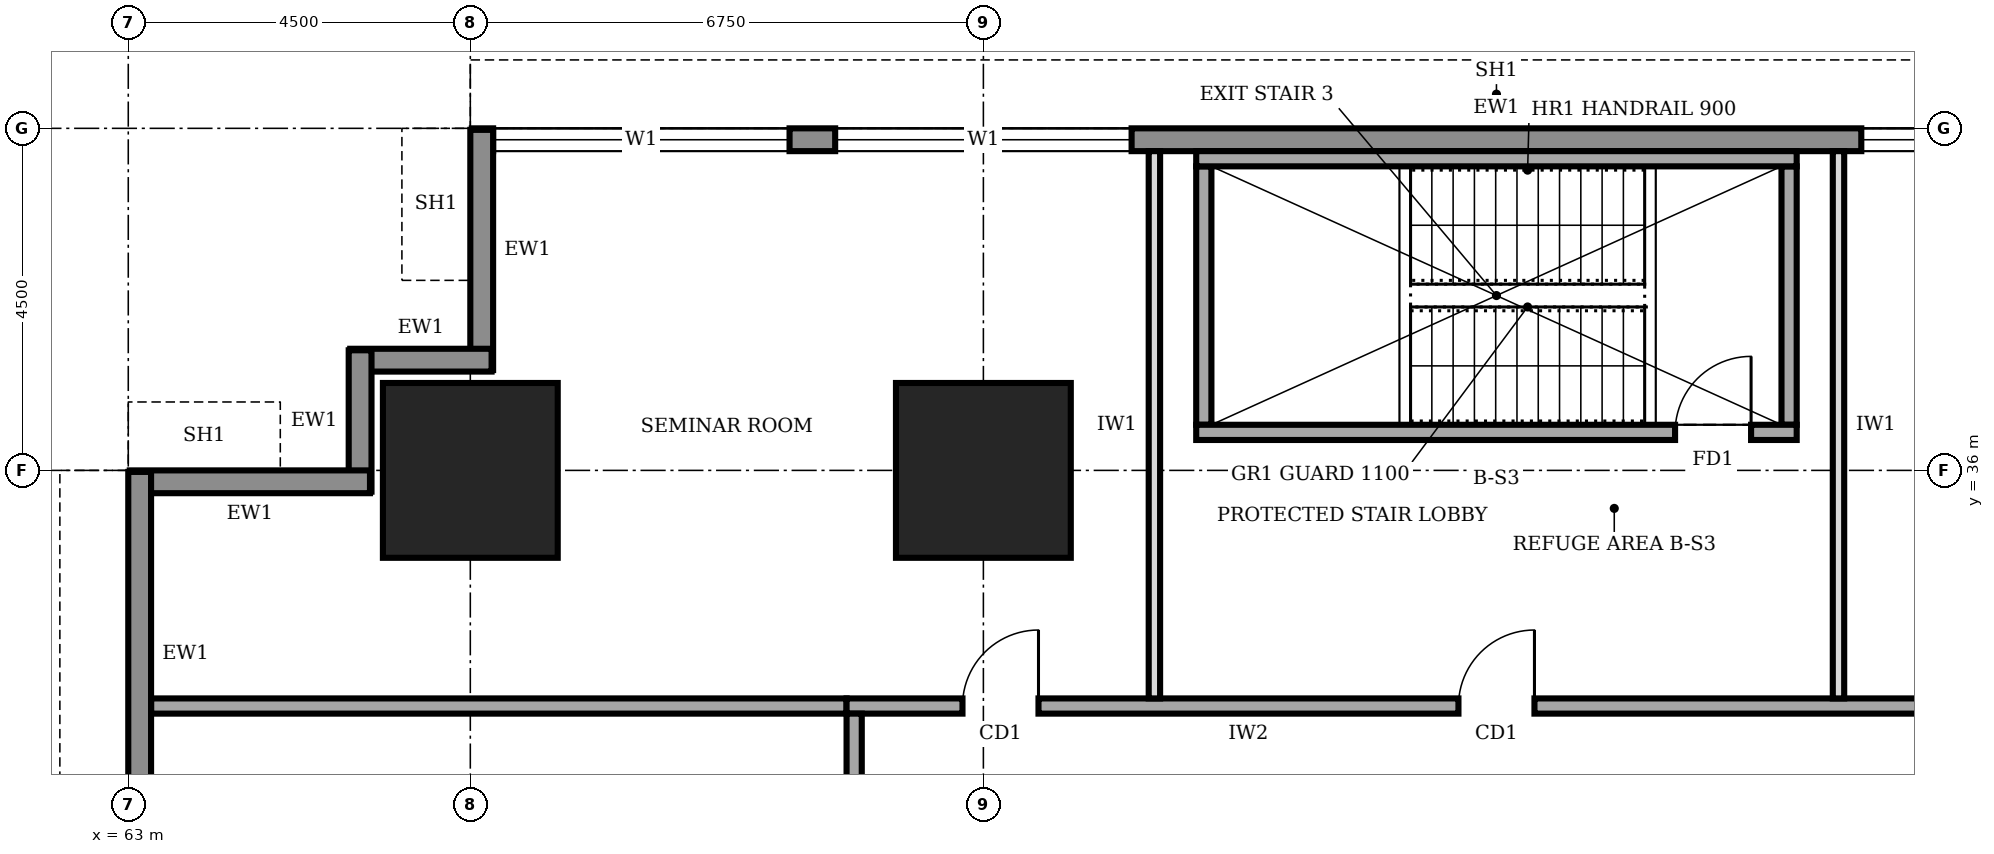
"""IFC4 building model, lengths in metres.
Left out: names, types, materials, properties, quantities, classifications, styles, units other than length and angle.
Written with IfcOpenShell. Run it as: python <this file> out.ifc"""

import sys

from ifc_helpers import new_model, si_unit, direction, frame, frame_2d, origin, origin_2d, place, context, subcontext, project, spatial, rectangle, extrude, element, fill, save


model = new_model("IFC4")
c1 = context("Model", 3, precision=1e-05, world=origin(), true_north=direction((0.0, 1.0)))
c2 = subcontext(c1, "Body", "Model", "MODEL_VIEW")
j1 = project(units=[si_unit("LENGTHUNIT", "METRE"), si_unit("PLANEANGLEUNIT", "RADIAN")], contexts=[c1])
p1 = place(None, origin())
s1 = spatial("IfcSite", under=j1, at=p1, CompositionType="ELEMENT")
p2 = place(p1, origin())
s2 = spatial("IfcBuilding", under=s1, at=p2, CompositionType="ELEMENT")
p3 = place(p2, frame((0.0, 0.0, 25.0)))
s3 = spatial("IfcBuildingStorey", under=s2, at=p3, CompositionType="ELEMENT", Elevation=25.0)
for number, where, z_axis, x_axis in (
    (1, (67.5, 36.0, 0.0), (0.0, 0.0, 1.0), (1.0, 0.0, 0.0)),
    (2, (74.25, 36.0, 0.0), (0.0, 0.0, 1.0), (1.0, 0.0, 0.0)),
):
    element("IfcColumn", number, at=place(p3, frame(where, z_axis=z_axis, x_axis=x_axis)), inside=s3, PredefinedType="COLUMN", context=c2, shape_type="SweptSolid", body=[
        extrude(rectangle(XDim=2.3, YDim=2.3, at=origin_2d()), origin(), (0.0, 0.0, 1.0), 4.0),
    ])
p4 = place(p3, frame((94.48, 40.35, 0.0), z_axis=(0.0, 0.0, 1.0), x_axis=(-1.0, 0.0, 0.0)))
e3 = element("IfcWall", 3, at=p4, inside=s3, PredefinedType="STANDARD", context=c2, shape_type="SweptSolid", body=[
    extrude(rectangle(XDim=26.96, YDim=0.3, at=frame_2d((13.48, 0.0))), origin(), (0.0, 0.0, 1.0), 3.75),
])
p5 = place(p4, frame((22.78, 0.0, 0.9)))
e4 = element("IfcOpeningElement", 4, at=p5, cuts=e3, PredefinedType="OPENING", context=c2, shape_type="SweptSolid", body=[
    extrude(rectangle(XDim=3.9, YDim=2.2, at=frame_2d((1.95, 1.1))), frame((0.0, 0.16, 0.0), z_axis=(0.0, -1.0, 0.0), x_axis=(1.0, 0.0, 0.0)), (0.0, 0.0, 1.0), 0.32),
])
p6 = place(p4, frame((18.28, 0.0, 0.9)))
e5 = element("IfcOpeningElement", 5, at=p6, cuts=e3, PredefinedType="OPENING", context=c2, shape_type="SweptSolid", body=[
    extrude(rectangle(XDim=3.9, YDim=2.2, at=frame_2d((1.95, 1.1))), frame((0.0, 0.16, 0.0), z_axis=(0.0, -1.0, 0.0), x_axis=(1.0, 0.0, 0.0)), (0.0, 0.0, 1.0), 0.32),
])
p7 = place(p4, frame((4.78, 0.0, 0.9)))
e6 = element("IfcOpeningElement", 6, at=p7, cuts=e3, PredefinedType="OPENING", context=c2, shape_type="SweptSolid", body=[
    extrude(rectangle(XDim=3.9, YDim=2.2, at=frame_2d((1.95, 1.1))), frame((0.0, 0.16, 0.0), z_axis=(0.0, -1.0, 0.0), x_axis=(1.0, 0.0, 0.0)), (0.0, 0.0, 1.0), 0.32),
])
p8 = place(p3, frame((67.65, 40.48, 0.0), z_axis=(0.0, 0.0, 1.0), x_axis=(0.0, -1.0, 0.0)))
e7 = element("IfcWall", 7, at=p8, inside=s3, PredefinedType="STANDARD", context=c2, shape_type="SweptSolid", body=[
    extrude(rectangle(XDim=3.16, YDim=0.3, at=frame_2d((1.58, 0.0))), origin(), (0.0, 0.0, 1.0), 2.85),
])
for number, where, z_axis, x_axis in (
    (8, (67.78, 37.45, 0.0), (0.0, 0.0, 1.0), (-1.0, 0.0, 0.0)),
    (9, (66.05, 37.58, 0.0), (0.0, 0.0, 1.0), (0.0, -1.0, 0.0)),
):
    element("IfcWall", number, at=place(p3, frame(where, z_axis=z_axis, x_axis=x_axis)), inside=s3, PredefinedType="STANDARD", context=c2, shape_type="SweptSolid", body=[
        extrude(rectangle(XDim=1.86, YDim=0.3, at=frame_2d((0.93, 0.0))), origin(), (0.0, 0.0, 1.0), 3.75),
    ])
p9 = place(p3, frame((66.18, 35.85, 0.0), z_axis=(0.0, 0.0, 1.0), x_axis=(-1.0, 0.0, 0.0)))
e10 = element("IfcWall", 10, at=p9, inside=s3, PredefinedType="STANDARD", context=c2, shape_type="SweptSolid", body=[
    extrude(rectangle(XDim=3.16, YDim=0.3, at=frame_2d((1.58, 0.0))), origin(), (0.0, 0.0, 1.0), 2.85),
])
p10 = place(p3, frame((63.15, 35.98, 0.0), z_axis=(0.0, 0.0, 1.0), x_axis=(0.0, -1.0, 0.0)))
e11 = element("IfcWall", 11, at=p10, inside=s3, PredefinedType="STANDARD", context=c2, shape_type="SweptSolid", body=[
    extrude(rectangle(XDim=31.46, YDim=0.3, at=frame_2d((15.73, 0.0))), origin(), (0.0, 0.0, 1.0), 3.75),
])
p11 = place(p10, frame((27.28, 0.0, 0.9)))
e12 = element("IfcOpeningElement", 12, at=p11, cuts=e11, PredefinedType="OPENING", context=c2, shape_type="SweptSolid", body=[
    extrude(rectangle(XDim=3.9, YDim=2.2, at=frame_2d((1.95, 1.1))), frame((0.0, 0.16, 0.0), z_axis=(0.0, -1.0, 0.0), x_axis=(1.0, 0.0, 0.0)), (0.0, 0.0, 1.0), 0.32),
])
p12 = place(p10, frame((22.78, 0.0, 0.9)))
e13 = element("IfcOpeningElement", 13, at=p12, cuts=e11, PredefinedType="OPENING", context=c2, shape_type="SweptSolid", body=[
    extrude(rectangle(XDim=3.9, YDim=2.2, at=frame_2d((1.95, 1.1))), frame((0.0, 0.16, 0.0), z_axis=(0.0, -1.0, 0.0), x_axis=(1.0, 0.0, 0.0)), (0.0, 0.0, 1.0), 0.32),
])
p13 = place(p10, frame((18.28, 0.0, 0.9)))
e14 = element("IfcOpeningElement", 14, at=p13, cuts=e11, PredefinedType="OPENING", context=c2, shape_type="SweptSolid", body=[
    extrude(rectangle(XDim=3.9, YDim=2.2, at=frame_2d((1.95, 1.1))), frame((0.0, 0.16, 0.0), z_axis=(0.0, -1.0, 0.0), x_axis=(1.0, 0.0, 0.0)), (0.0, 0.0, 1.0), 0.32),
])
p14 = place(p10, frame((13.78, 0.0, 0.9)))
e15 = element("IfcOpeningElement", 15, at=p14, cuts=e11, PredefinedType="OPENING", context=c2, shape_type="SweptSolid", body=[
    extrude(rectangle(XDim=3.9, YDim=2.2, at=frame_2d((1.95, 1.1))), frame((0.0, 0.16, 0.0), z_axis=(0.0, -1.0, 0.0), x_axis=(1.0, 0.0, 0.0)), (0.0, 0.0, 1.0), 0.32),
])
p15 = place(p10, frame((9.28, 0.0, 0.9)))
e16 = element("IfcOpeningElement", 16, at=p15, cuts=e11, PredefinedType="OPENING", context=c2, shape_type="SweptSolid", body=[
    extrude(rectangle(XDim=3.9, YDim=2.2, at=frame_2d((1.95, 1.1))), frame((0.0, 0.16, 0.0), z_axis=(0.0, -1.0, 0.0), x_axis=(1.0, 0.0, 0.0)), (0.0, 0.0, 1.0), 0.32),
])
p16 = place(p10, frame((4.78, 0.0, 0.9)))
e17 = element("IfcOpeningElement", 17, at=p16, cuts=e11, PredefinedType="OPENING", context=c2, shape_type="SweptSolid", body=[
    extrude(rectangle(XDim=3.9, YDim=2.2, at=frame_2d((1.95, 1.1))), frame((0.0, 0.16, 0.0), z_axis=(0.0, -1.0, 0.0), x_axis=(1.0, 0.0, 0.0)), (0.0, 0.0, 1.0), 0.32),
])
p17 = place(p3, frame((89.35, 32.9, 0.0), z_axis=(0.0, 0.0, 1.0), x_axis=(-1.0, 0.0, 0.0)))
e18 = element("IfcWall", 18, at=p17, inside=s3, PredefinedType="SOLIDWALL", context=c2, shape_type="SweptSolid", body=[
    extrude(rectangle(XDim=16.9, YDim=0.2, at=frame_2d((8.45, 0.0))), origin(), (0.0, 0.0, 1.0), 3.75),
])
p18 = place(p17, frame((14.375, 0.0, 0.0)))
e19 = element("IfcOpeningElement", 19, at=p18, cuts=e18, PredefinedType="OPENING", context=c2, shape_type="SweptSolid", body=[
    extrude(rectangle(XDim=1.0, YDim=2.1, at=frame_2d((0.5, 1.05))), frame((0.0, 0.11, 0.0), z_axis=(0.0, -1.0, 0.0), x_axis=(1.0, 0.0, 0.0)), (0.0, 0.0, 1.0), 0.22),
])
p19 = place(p17, frame((7.85, 0.0, 0.0)))
e20 = element("IfcOpeningElement", 20, at=p19, cuts=e18, PredefinedType="OPENING", context=c2, shape_type="SweptSolid", body=[
    extrude(rectangle(XDim=1.0, YDim=2.1, at=frame_2d((0.5, 1.05))), frame((0.0, 0.11, 0.0), z_axis=(0.0, -1.0, 0.0), x_axis=(1.0, 0.0, 0.0)), (0.0, 0.0, 1.0), 0.22),
])
p20 = place(p17, frame((1.325, 0.0, 0.0)))
e21 = element("IfcOpeningElement", 21, at=p20, cuts=e18, PredefinedType="OPENING", context=c2, shape_type="SweptSolid", body=[
    extrude(rectangle(XDim=1.0, YDim=2.1, at=frame_2d((0.5, 1.05))), frame((0.0, 0.11, 0.0), z_axis=(0.0, -1.0, 0.0), x_axis=(1.0, 0.0, 0.0)), (0.0, 0.0, 1.0), 0.22),
])
p21 = place(p3, frame((72.55, 32.8, 0.0), z_axis=(0.0, 0.0, 1.0), x_axis=(0.0, -1.0, 0.0)))
e22 = element("IfcWall", 22, at=p21, inside=s3, PredefinedType="SOLIDWALL", context=c2, shape_type="SweptSolid", body=[
    extrude(rectangle(XDim=23.8, YDim=0.2, at=frame_2d((11.9, 0.0))), origin(), (0.0, 0.0, 1.0), 3.75),
])
p22 = place(p21, frame((21.05, 0.0, 0.0)))
e23 = element("IfcOpeningElement", 23, at=p22, cuts=e22, PredefinedType="OPENING", context=c2, shape_type="SweptSolid", body=[
    extrude(rectangle(XDim=1.0, YDim=2.1, at=frame_2d((0.5, 1.05))), frame((0.0, 0.11, 0.0), z_axis=(0.0, -1.0, 0.0), x_axis=(1.0, 0.0, 0.0)), (0.0, 0.0, 1.0), 0.22),
])
p23 = place(p21, frame((16.55, 0.0, 0.0)))
e24 = element("IfcOpeningElement", 24, at=p23, cuts=e22, PredefinedType="OPENING", context=c2, shape_type="SweptSolid", body=[
    extrude(rectangle(XDim=1.0, YDim=2.1, at=frame_2d((0.5, 1.05))), frame((0.0, 0.11, 0.0), z_axis=(0.0, -1.0, 0.0), x_axis=(1.0, 0.0, 0.0)), (0.0, 0.0, 1.0), 0.22),
])
p24 = place(p21, frame((12.05, 0.0, 0.0)))
e25 = element("IfcOpeningElement", 25, at=p24, cuts=e22, PredefinedType="OPENING", context=c2, shape_type="SweptSolid", body=[
    extrude(rectangle(XDim=1.0, YDim=2.1, at=frame_2d((0.5, 1.05))), frame((0.0, 0.11, 0.0), z_axis=(0.0, -1.0, 0.0), x_axis=(1.0, 0.0, 0.0)), (0.0, 0.0, 1.0), 0.22),
])
p25 = place(p21, frame((7.55, 0.0, 0.0)))
e26 = element("IfcOpeningElement", 26, at=p25, cuts=e22, PredefinedType="OPENING", context=c2, shape_type="SweptSolid", body=[
    extrude(rectangle(XDim=1.0, YDim=2.1, at=frame_2d((0.5, 1.05))), frame((0.0, 0.11, 0.0), z_axis=(0.0, -1.0, 0.0), x_axis=(1.0, 0.0, 0.0)), (0.0, 0.0, 1.0), 0.22),
])
p26 = place(p21, frame((2.3, 0.0, 0.0)))
e27 = element("IfcOpeningElement", 27, at=p26, cuts=e22, PredefinedType="OPENING", context=c2, shape_type="SweptSolid", body=[
    extrude(rectangle(XDim=1.0, YDim=2.1, at=frame_2d((0.5, 1.05))), frame((0.0, 0.11, 0.0), z_axis=(0.0, -1.0, 0.0), x_axis=(1.0, 0.0, 0.0)), (0.0, 0.0, 1.0), 0.22),
])
p27 = place(p3, frame((63.3, 32.9, 0.0), z_axis=(0.0, 0.0, 1.0), x_axis=(1.0, 0.0, 0.0)))
e28 = element("IfcWall", 28, at=p27, inside=s3, PredefinedType="SOLIDWALL", context=c2, shape_type="SweptSolid", body=[
    extrude(rectangle(XDim=9.15, YDim=0.2, at=frame_2d((4.575, 0.0))), origin(), (0.0, 0.0, 1.0), 3.75),
])
for number, where, z_axis, x_axis in (
    (29, (76.5, 33.0, 0.0), (0.0, 0.0, 1.0), (0.0, 1.0, 0.0)),
    (30, (85.5, 33.0, 0.0), (0.0, 0.0, 1.0), (0.0, 1.0, 0.0)),
):
    element("IfcWall", number, at=place(p3, frame(where, z_axis=z_axis, x_axis=x_axis)), inside=s3, PredefinedType="PARTITIONING", context=c2, shape_type="SweptSolid", body=[
        extrude(rectangle(XDim=7.2, YDim=0.15, at=frame_2d((3.6, 0.0))), origin(), (0.0, 0.0, 1.0), 3.75),
    ])
p28 = place(p3, frame((77.05, 36.5, 0.0), z_axis=(0.0, 0.0, 1.0), x_axis=(1.0, 0.0, 0.0)))
e31 = element("IfcWall", 31, at=p28, inside=s3, PredefinedType="SOLIDWALL", context=c2, shape_type="SweptSolid", body=[
    extrude(rectangle(XDim=7.9, YDim=0.2, at=frame_2d((3.95, 0.0))), origin(), (0.0, 0.0, 1.0), 3.75),
])
p29 = place(p28, frame((6.3, 0.0, 0.0)))
e32 = element("IfcOpeningElement", 32, at=p29, cuts=e31, PredefinedType="OPENING", context=c2, shape_type="SweptSolid", body=[
    extrude(rectangle(XDim=1.0, YDim=2.1, at=frame_2d((0.5, 1.05))), frame((0.0, 0.11, 0.0), z_axis=(0.0, -1.0, 0.0), x_axis=(1.0, 0.0, 0.0)), (0.0, 0.0, 1.0), 0.22),
])
p30 = place(p3, frame((77.05, 40.1, 0.0), z_axis=(0.0, 0.0, 1.0), x_axis=(1.0, 0.0, 0.0)))
e33 = element("IfcWall", 33, at=p30, inside=s3, PredefinedType="SOLIDWALL", context=c2, shape_type="SweptSolid", body=[
    extrude(rectangle(XDim=7.9, YDim=0.2, at=frame_2d((3.95, 0.0))), origin(), (0.0, 0.0, 1.0), 3.75),
])
for number, where, z_axis, x_axis in (
    (34, (77.15, 36.6, 0.0), (0.0, 0.0, 1.0), (0.0, 1.0, 0.0)),
    (35, (84.85, 36.6, 0.0), (0.0, 0.0, 1.0), (0.0, 1.0, 0.0)),
):
    element("IfcWall", number, at=place(p3, frame(where, z_axis=z_axis, x_axis=x_axis)), inside=s3, PredefinedType="SOLIDWALL", context=c2, shape_type="SweptSolid", body=[
        extrude(rectangle(XDim=3.4, YDim=0.2, at=frame_2d((1.7, 0.0))), origin(), (0.0, 0.0, 1.0), 3.75),
    ])
p31 = place(p5, origin())
e36 = element("IfcWindow", 36, at=p31, inside=s3, PartitioningType="SINGLE_PANEL", PredefinedType="WINDOW", context=c2, shape_type="SweptSolid", body=[
    extrude(rectangle(XDim=3.9, YDim=2.2, at=frame_2d((1.95, 1.1))), frame((0.0, 0.03, 0.0), z_axis=(0.0, -1.0, 0.0), x_axis=(1.0, 0.0, 0.0)), (0.0, 0.0, 1.0), 0.06),
])
fill(e4, e36)
p32 = place(p6, origin())
e37 = element("IfcWindow", 37, at=p32, inside=s3, PartitioningType="SINGLE_PANEL", PredefinedType="WINDOW", context=c2, shape_type="SweptSolid", body=[
    extrude(rectangle(XDim=3.9, YDim=2.2, at=frame_2d((1.95, 1.1))), frame((0.0, 0.03, 0.0), z_axis=(0.0, -1.0, 0.0), x_axis=(1.0, 0.0, 0.0)), (0.0, 0.0, 1.0), 0.06),
])
fill(e5, e37)
p33 = place(p7, origin())
e38 = element("IfcWindow", 38, at=p33, inside=s3, PartitioningType="SINGLE_PANEL", PredefinedType="WINDOW", context=c2, shape_type="SweptSolid", body=[
    extrude(rectangle(XDim=3.9, YDim=2.2, at=frame_2d((1.95, 1.1))), frame((0.0, 0.03, 0.0), z_axis=(0.0, -1.0, 0.0), x_axis=(1.0, 0.0, 0.0)), (0.0, 0.0, 1.0), 0.06),
])
fill(e6, e38)
p34 = place(p18, frame((1.0, 0.0, 0.0), z_axis=(0.0, 0.0, 1.0), x_axis=(-1.0, 0.0, 0.0)))
e39 = element("IfcDoor", 39, at=p34, inside=s3, OperationType="SINGLE_SWING_RIGHT", PredefinedType="DOOR", context=c2, shape_type="SweptSolid", body=[
    extrude(rectangle(XDim=1.0, YDim=2.1, at=frame_2d((0.5, 1.05))), frame((0.0, 0.025, 0.0), z_axis=(0.0, -1.0, 0.0), x_axis=(1.0, 0.0, 0.0)), (0.0, 0.0, 1.0), 0.05),
])
fill(e19, e39)
p35 = place(p19, frame((1.0, 0.0, 0.0), z_axis=(0.0, 0.0, 1.0), x_axis=(-1.0, 0.0, 0.0)))
e40 = element("IfcDoor", 40, at=p35, inside=s3, OperationType="SINGLE_SWING_RIGHT", PredefinedType="DOOR", context=c2, shape_type="SweptSolid", body=[
    extrude(rectangle(XDim=1.0, YDim=2.1, at=frame_2d((0.5, 1.05))), frame((0.0, 0.025, 0.0), z_axis=(0.0, -1.0, 0.0), x_axis=(1.0, 0.0, 0.0)), (0.0, 0.0, 1.0), 0.05),
])
fill(e20, e40)
p36 = place(p29, origin())
e41 = element("IfcDoor", 41, at=p36, inside=s3, OperationType="SINGLE_SWING_RIGHT", PredefinedType="DOOR", context=c2, shape_type="SweptSolid", body=[
    extrude(rectangle(XDim=1.0, YDim=2.1, at=frame_2d((0.5, 1.05))), frame((0.0, 0.025, 0.0), z_axis=(0.0, -1.0, 0.0), x_axis=(1.0, 0.0, 0.0)), (0.0, 0.0, 1.0), 0.05),
])
fill(e32, e41)
save(model, sys.argv[1])
